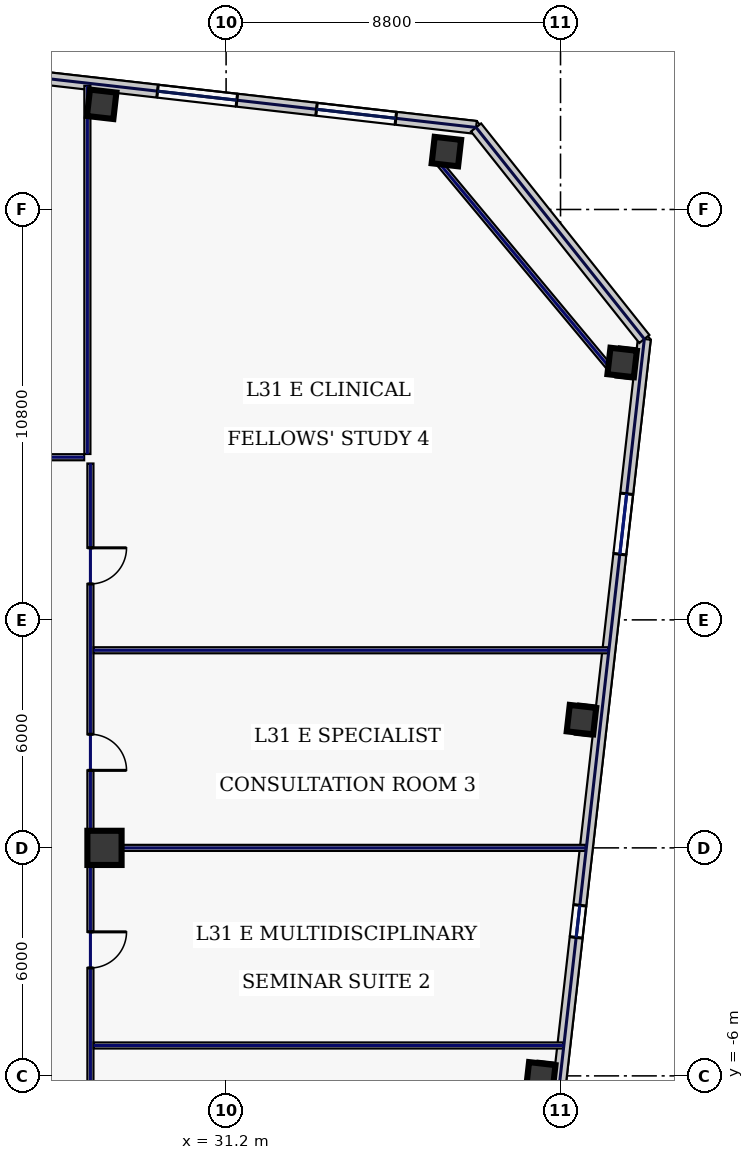
"""IFC4 building model, lengths in metres.
Left out: names, types, materials, properties, quantities, classifications, styles, units other than length and angle.
Written with IfcOpenShell. Run it as: python <this file> out.ifc"""

import sys

from ifc_helpers import new_model, si_unit, direction, frame, frame_2d, origin, origin_2d, place, context, subcontext, project, spatial, rectangle, hollow_rectangle, extrude, element, fill, save


model = new_model("IFC4")
c1 = context("Model", 3, precision=1e-05, world=origin(), true_north=direction((0.0, 1.0)))
c2 = subcontext(c1, "Body", "Model", "MODEL_VIEW")
j1 = project(units=[si_unit("LENGTHUNIT", "METRE"), si_unit("PLANEANGLEUNIT", "RADIAN")], contexts=[c1])
p1 = place(None, origin())
s1 = spatial("IfcSite", under=j1, at=p1, CompositionType="ELEMENT")
p2 = place(p1, origin())
s2 = spatial("IfcBuilding", under=s1, at=p2, CompositionType="ELEMENT")
p3 = place(p2, frame((0.0, 0.0, 137.4)))
s3 = spatial("IfcBuildingStorey", under=s2, at=p3, CompositionType="ELEMENT", Elevation=137.4)
p4 = place(p3, frame((28.0, 0.0, 0.0), z_axis=(0.0, 0.0, 1.0), x_axis=(1.0, 0.0, 0.0)))
e1 = element("IfcColumn", 1, at=p4, inside=s3, PredefinedType="COLUMN", context=c2, shape_type="SweptSolid", body=[
    extrude(hollow_rectangle(XDim=0.9, YDim=0.9, WallThickness=0.04, at=origin_2d()), origin(), (0.0, 0.0, 1.0), 3.74),
])
for number, where, z_axis, x_axis in (
    (2, (36.997, 18.323, 0.0), (0.0, 0.0, 1.0), (0.994, -0.113, 0.0)),
    (3, (27.926, 19.568, 0.0), (0.0, 0.0, 1.0), (0.994, -0.113, 0.0)),
    (4, (39.48, -6.025, 0.0), (0.0, 0.0, 1.0), (0.994, -0.113, 0.0)),
    (5, (40.551, 3.375, 0.0), (0.0, 0.0, 1.0), (0.994, -0.113, 0.0)),
    (6, (41.622, 12.774, 0.0), (0.0, 0.0, 1.0), (0.994, -0.113, 0.0)),
):
    element("IfcColumn", number, at=place(p3, frame(where, z_axis=z_axis, x_axis=x_axis)), inside=s3, PredefinedType="COLUMN", context=c2, shape_type="SweptSolid", body=[
        extrude(hollow_rectangle(XDim=0.7, YDim=0.7, WallThickness=0.032, at=origin_2d()), origin(), (0.0, 0.0, 1.0), 3.74),
    ])
p5 = place(p3, frame((37.777, 18.958, 0.0), z_axis=(0.0, 0.0, 1.0), x_axis=(-0.993571362037, 0.113207546299, 0.0)))
e7 = element("IfcWall", 7, at=p5, inside=s3, PredefinedType="STANDARD", context=c2, shape_type="SweptSolid", body=[
    extrude(rectangle(XDim=21.223, YDim=0.34, at=frame_2d((10.611, 0.0))), origin(), (0.0, 0.0, 1.0), 3.74),
])
p6 = place(p5, frame((16.756, 0.0, 0.67)))
e8 = element("IfcOpeningElement", 8, at=p6, cuts=e7, PredefinedType="OPENING", context=c2, shape_type="SweptSolid", body=[
    extrude(rectangle(XDim=0.85, YDim=1.85, at=frame_2d((0.425, 0.925))), frame((0.0, 0.18, 0.0), z_axis=(0.0, -1.0, 0.0), x_axis=(1.0, 0.0, 0.0)), (0.0, 0.0, 1.0), 0.36),
])
p7 = place(p5, frame((11.285, 0.0, 0.67)))
e9 = element("IfcOpeningElement", 9, at=p7, cuts=e7, PredefinedType="OPENING", context=c2, shape_type="SweptSolid", body=[
    extrude(rectangle(XDim=2.1, YDim=2.2, at=frame_2d((1.05, 1.1))), frame((0.0, 0.18, 0.0), z_axis=(0.0, -1.0, 0.0), x_axis=(1.0, 0.0, 0.0)), (0.0, 0.0, 1.0), 0.36),
])
p8 = place(p5, frame((6.336, 0.0, 0.67)))
e10 = element("IfcOpeningElement", 10, at=p8, cuts=e7, PredefinedType="OPENING", context=c2, shape_type="SweptSolid", body=[
    extrude(rectangle(XDim=2.1, YDim=2.2, at=frame_2d((1.05, 1.1))), frame((0.0, 0.18, 0.0), z_axis=(0.0, -1.0, 0.0), x_axis=(1.0, 0.0, 0.0)), (0.0, 0.0, 1.0), 0.36),
])
p9 = place(p5, frame((2.125, 0.0, 0.67)))
e11 = element("IfcOpeningElement", 11, at=p9, cuts=e7, PredefinedType="OPENING", context=c2, shape_type="SweptSolid", body=[
    extrude(rectangle(XDim=2.1, YDim=2.2, at=frame_2d((1.05, 1.1))), frame((0.0, 0.18, 0.0), z_axis=(0.0, -1.0, 0.0), x_axis=(1.0, 0.0, 0.0)), (0.0, 0.0, 1.0), 0.36),
])
p10 = place(p3, frame((37.768, -25.556, 0.0), z_axis=(0.0, 0.0, 1.0), x_axis=(0.113201605824, 0.993572038877, 0.0)))
e12 = element("IfcWall", 12, at=p10, inside=s3, PredefinedType="STANDARD", context=c2, shape_type="SweptSolid", body=[
    extrude(rectangle(XDim=39.2, YDim=0.34, at=frame_2d((19.6, 0.0))), origin(), (0.0, 0.0, 1.0), 3.74),
])
p11 = place(p10, frame((4.1, 0.0, 0.58)))
e13 = element("IfcOpeningElement", 13, at=p11, cuts=e12, PredefinedType="OPENING", context=c2, shape_type="SweptSolid", body=[
    extrude(rectangle(XDim=1.6, YDim=2.3, at=frame_2d((0.8, 1.15))), frame((0.0, 0.18, 0.0), z_axis=(0.0, -1.0, 0.0), x_axis=(1.0, 0.0, 0.0)), (0.0, 0.0, 1.0), 0.36),
])
p12 = place(p10, frame((13.9, 0.0, 0.58)))
e14 = element("IfcOpeningElement", 14, at=p12, cuts=e12, PredefinedType="OPENING", context=c2, shape_type="SweptSolid", body=[
    extrude(rectangle(XDim=1.6, YDim=2.3, at=frame_2d((0.8, 1.15))), frame((0.0, 0.18, 0.0), z_axis=(0.0, -1.0, 0.0), x_axis=(1.0, 0.0, 0.0)), (0.0, 0.0, 1.0), 0.36),
])
p13 = place(p10, frame((23.35, 0.0, 0.75)))
e15 = element("IfcOpeningElement", 15, at=p13, cuts=e12, PredefinedType="OPENING", context=c2, shape_type="SweptSolid", body=[
    extrude(rectangle(XDim=0.85, YDim=1.85, at=frame_2d((0.425, 0.925))), frame((0.0, 0.18, 0.0), z_axis=(0.0, -1.0, 0.0), x_axis=(1.0, 0.0, 0.0)), (0.0, 0.0, 1.0), 0.36),
])
p14 = place(p10, frame((33.5, 0.0, 0.58)))
e16 = element("IfcOpeningElement", 16, at=p14, cuts=e12, PredefinedType="OPENING", context=c2, shape_type="SweptSolid", body=[
    extrude(rectangle(XDim=1.6, YDim=2.3, at=frame_2d((0.8, 1.15))), frame((0.0, 0.18, 0.0), z_axis=(0.0, -1.0, 0.0), x_axis=(1.0, 0.0, 0.0)), (0.0, 0.0, 1.0), 0.36),
])
p15 = place(p3, frame((42.206, 13.392, 0.0), z_axis=(0.0, 0.0, 1.0), x_axis=(-0.622524521309, 0.782600294128, 0.0)))
e17 = element("IfcWall", 17, at=p15, inside=s3, PredefinedType="STANDARD", context=c2, shape_type="SweptSolid", body=[
    extrude(rectangle(XDim=7.113, YDim=0.34, at=frame_2d((3.557, 0.0))), origin(), (0.0, 0.0, 1.0), 3.74),
])
p16 = place(p3, frame((41.361, 12.556, 0.0), z_axis=(0.0, 0.0, 1.0), x_axis=(-0.640217638562, 0.768193579298, 0.0)))
e18 = element("IfcWall", 18, at=p16, inside=s3, PredefinedType="PARTITIONING", context=c2, shape_type="SweptSolid", body=[
    extrude(rectangle(XDim=7.224, YDim=0.16, at=frame_2d((3.612, 0.0))), origin(), (0.0, 0.0, 1.0), 3.74),
])
p17 = place(p3, frame((-27.465, 10.28, 0.0), z_axis=(0.0, 0.0, 1.0), x_axis=(1.0, 0.0, 0.0)))
e19 = element("IfcWall", 19, at=p17, inside=s3, PredefinedType="PARTITIONING", context=c2, shape_type="SweptSolid", body=[
    extrude(rectangle(XDim=54.93, YDim=0.16, at=frame_2d((27.465, 0.0))), origin(), (0.0, 0.0, 1.0), 3.74),
])
p18 = place(p17, frame((1.869, 0.0, 0.0)))
e20 = element("IfcOpeningElement", 20, at=p18, cuts=e19, PredefinedType="OPENING", context=c2, shape_type="SweptSolid", body=[
    extrude(rectangle(XDim=1.3, YDim=2.2, at=frame_2d((0.65, 1.1))), frame((0.0, 0.09, 0.0), z_axis=(0.0, -1.0, 0.0), x_axis=(1.0, 0.0, 0.0)), (0.0, 0.0, 1.0), 0.18),
])
p19 = place(p17, frame((7.1, 0.0, 0.0)))
e21 = element("IfcOpeningElement", 21, at=p19, cuts=e19, PredefinedType="OPENING", context=c2, shape_type="SweptSolid", body=[
    extrude(rectangle(XDim=0.95, YDim=2.2, at=frame_2d((0.475, 1.1))), frame((0.0, 0.09, 0.0), z_axis=(0.0, -1.0, 0.0), x_axis=(1.0, 0.0, 0.0)), (0.0, 0.0, 1.0), 0.18),
])
p20 = place(p17, frame((12.5, 0.0, 0.0)))
e22 = element("IfcOpeningElement", 22, at=p20, cuts=e19, PredefinedType="OPENING", context=c2, shape_type="SweptSolid", body=[
    extrude(rectangle(XDim=0.95, YDim=2.2, at=frame_2d((0.475, 1.1))), frame((0.0, 0.09, 0.0), z_axis=(0.0, -1.0, 0.0), x_axis=(1.0, 0.0, 0.0)), (0.0, 0.0, 1.0), 0.18),
])
p21 = place(p17, frame((18.325, 0.0, 0.0)))
e23 = element("IfcOpeningElement", 23, at=p21, cuts=e19, PredefinedType="OPENING", context=c2, shape_type="SweptSolid", body=[
    extrude(rectangle(XDim=0.95, YDim=2.2, at=frame_2d((0.475, 1.1))), frame((0.0, 0.09, 0.0), z_axis=(0.0, -1.0, 0.0), x_axis=(1.0, 0.0, 0.0)), (0.0, 0.0, 1.0), 0.18),
])
p22 = place(p17, frame((24.575, 0.0, 0.0)))
e24 = element("IfcOpeningElement", 24, at=p22, cuts=e19, PredefinedType="OPENING", context=c2, shape_type="SweptSolid", body=[
    extrude(rectangle(XDim=0.95, YDim=2.2, at=frame_2d((0.475, 1.1))), frame((0.0, 0.09, 0.0), z_axis=(0.0, -1.0, 0.0), x_axis=(1.0, 0.0, 0.0)), (0.0, 0.0, 1.0), 0.18),
])
p23 = place(p17, frame((30.69, 0.0, 0.0)))
e25 = element("IfcOpeningElement", 25, at=p23, cuts=e19, PredefinedType="OPENING", context=c2, shape_type="SweptSolid", body=[
    extrude(rectangle(XDim=1.3, YDim=2.2, at=frame_2d((0.65, 1.1))), frame((0.0, 0.09, 0.0), z_axis=(0.0, -1.0, 0.0), x_axis=(1.0, 0.0, 0.0)), (0.0, 0.0, 1.0), 0.18),
])
p24 = place(p17, frame((37.02, 0.0, 0.0)))
e26 = element("IfcOpeningElement", 26, at=p24, cuts=e19, PredefinedType="OPENING", context=c2, shape_type="SweptSolid", body=[
    extrude(rectangle(XDim=1.3, YDim=2.2, at=frame_2d((0.65, 1.1))), frame((0.0, 0.09, 0.0), z_axis=(0.0, -1.0, 0.0), x_axis=(1.0, 0.0, 0.0)), (0.0, 0.0, 1.0), 0.18),
])
p25 = place(p17, frame((44.73, 0.0, 0.0)))
e27 = element("IfcOpeningElement", 27, at=p25, cuts=e19, PredefinedType="OPENING", context=c2, shape_type="SweptSolid", body=[
    extrude(rectangle(XDim=1.3, YDim=2.2, at=frame_2d((0.65, 1.1))), frame((0.0, 0.09, 0.0), z_axis=(0.0, -1.0, 0.0), x_axis=(1.0, 0.0, 0.0)), (0.0, 0.0, 1.0), 0.18),
])
p26 = place(p17, frame((51.956, 0.0, 0.0)))
e28 = element("IfcOpeningElement", 28, at=p26, cuts=e19, PredefinedType="OPENING", context=c2, shape_type="SweptSolid", body=[
    extrude(rectangle(XDim=0.95, YDim=2.2, at=frame_2d((0.475, 1.1))), frame((0.0, 0.09, 0.0), z_axis=(0.0, -1.0, 0.0), x_axis=(1.0, 0.0, 0.0)), (0.0, 0.0, 1.0), 0.18),
])
p27 = place(p3, frame((27.63, 10.115, 0.0), z_axis=(0.0, 0.0, 1.0), x_axis=(0.0, -1.0, 0.0)))
e29 = element("IfcWall", 29, at=p27, inside=s3, PredefinedType="PARTITIONING", context=c2, shape_type="SweptSolid", body=[
    extrude(rectangle(XDim=20.13, YDim=0.16, at=frame_2d((10.065, 0.0))), origin(), (0.0, 0.0, 1.0), 3.74),
])
p28 = place(p27, frame((17.181, 0.0, 0.0)))
e30 = element("IfcOpeningElement", 30, at=p28, cuts=e29, PredefinedType="OPENING", context=c2, shape_type="SweptSolid", body=[
    extrude(rectangle(XDim=0.95, YDim=2.2, at=frame_2d((0.475, 1.1))), frame((0.0, 0.09, 0.0), z_axis=(0.0, -1.0, 0.0), x_axis=(1.0, 0.0, 0.0)), (0.0, 0.0, 1.0), 0.18),
])
p29 = place(p27, frame((12.325, 0.0, 0.0)))
e31 = element("IfcOpeningElement", 31, at=p29, cuts=e29, PredefinedType="OPENING", context=c2, shape_type="SweptSolid", body=[
    extrude(rectangle(XDim=0.95, YDim=2.2, at=frame_2d((0.475, 1.1))), frame((0.0, 0.09, 0.0), z_axis=(0.0, -1.0, 0.0), x_axis=(1.0, 0.0, 0.0)), (0.0, 0.0, 1.0), 0.18),
])
p30 = place(p27, frame((7.125, 0.0, 0.0)))
e32 = element("IfcOpeningElement", 32, at=p30, cuts=e29, PredefinedType="OPENING", context=c2, shape_type="SweptSolid", body=[
    extrude(rectangle(XDim=0.95, YDim=2.2, at=frame_2d((0.475, 1.1))), frame((0.0, 0.09, 0.0), z_axis=(0.0, -1.0, 0.0), x_axis=(1.0, 0.0, 0.0)), (0.0, 0.0, 1.0), 0.18),
])
p31 = place(p27, frame((2.219, 0.0, 0.0)))
e33 = element("IfcOpeningElement", 33, at=p31, cuts=e29, PredefinedType="OPENING", context=c2, shape_type="SweptSolid", body=[
    extrude(rectangle(XDim=0.95, YDim=2.2, at=frame_2d((0.475, 1.1))), frame((0.0, 0.09, 0.0), z_axis=(0.0, -1.0, 0.0), x_axis=(1.0, 0.0, 0.0)), (0.0, 0.0, 1.0), 0.18),
])
p32 = place(p3, frame((27.55, 10.365, 0.0), z_axis=(0.0, 0.0, 1.0), x_axis=(0.0, 1.0, 0.0)))
e34 = element("IfcWall", 34, at=p32, inside=s3, PredefinedType="PARTITIONING", context=c2, shape_type="SweptSolid", body=[
    extrude(rectangle(XDim=9.688, YDim=0.16, at=frame_2d((4.844, 0.0))), origin(), (0.0, 0.0, 1.0), 3.74),
])
p33 = place(p3, frame((27.715, -5.2, 0.0), z_axis=(0.0, 0.0, 1.0), x_axis=(1.0, 0.0, 0.0)))
e35 = element("IfcWall", 35, at=p33, inside=s3, PredefinedType="PARTITIONING", context=c2, shape_type="SweptSolid", body=[
    extrude(rectangle(XDim=12.352, YDim=0.16, at=frame_2d((6.176, 0.0))), origin(), (0.0, 0.0, 1.0), 3.74),
])
p34 = place(p3, frame((27.715, 0.0, 0.0), z_axis=(0.0, 0.0, 1.0), x_axis=(1.0, 0.0, 0.0)))
e36 = element("IfcWall", 36, at=p34, inside=s3, PredefinedType="PARTITIONING", context=c2, shape_type="SweptSolid", body=[
    extrude(rectangle(XDim=12.945, YDim=0.16, at=frame_2d((6.472, 0.0))), origin(), (0.0, 0.0, 1.0), 3.235),
])
p35 = place(p3, frame((27.715, 5.2, 0.0), z_axis=(0.0, 0.0, 1.0), x_axis=(1.0, 0.0, 0.0)))
e37 = element("IfcWall", 37, at=p35, inside=s3, PredefinedType="PARTITIONING", context=c2, shape_type="SweptSolid", body=[
    extrude(rectangle(XDim=13.537, YDim=0.16, at=frame_2d((6.769, 0.0))), origin(), (0.0, 0.0, 1.0), 3.74),
])
p36 = place(p8, origin())
e38 = element("IfcWindow", 38, at=p36, inside=s3, PartitioningType="SINGLE_PANEL", PredefinedType="WINDOW", context=c2, shape_type="SweptSolid", body=[
    extrude(rectangle(XDim=2.1, YDim=2.2, at=frame_2d((1.05, 1.1))), frame((0.0, 0.03, 0.0), z_axis=(0.0, -1.0, 0.0), x_axis=(1.0, 0.0, 0.0)), (0.0, 0.0, 1.0), 0.06),
])
fill(e10, e38)
p37 = place(p9, origin())
e39 = element("IfcWindow", 39, at=p37, inside=s3, PartitioningType="SINGLE_PANEL", PredefinedType="WINDOW", context=c2, shape_type="SweptSolid", body=[
    extrude(rectangle(XDim=2.1, YDim=2.2, at=frame_2d((1.05, 1.1))), frame((0.0, 0.03, 0.0), z_axis=(0.0, -1.0, 0.0), x_axis=(1.0, 0.0, 0.0)), (0.0, 0.0, 1.0), 0.06),
])
fill(e11, e39)
p38 = place(p13, origin())
e40 = element("IfcWindow", 40, at=p38, inside=s3, PartitioningType="SINGLE_PANEL", PredefinedType="WINDOW", context=c2, shape_type="SweptSolid", body=[
    extrude(rectangle(XDim=0.85, YDim=1.85, at=frame_2d((0.425, 0.925))), frame((0.0, 0.03, 0.0), z_axis=(0.0, -1.0, 0.0), x_axis=(1.0, 0.0, 0.0)), (0.0, 0.0, 1.0), 0.06),
])
fill(e15, e40)
p39 = place(p14, origin())
e41 = element("IfcWindow", 41, at=p39, inside=s3, PartitioningType="SINGLE_PANEL", PredefinedType="WINDOW", context=c2, shape_type="SweptSolid", body=[
    extrude(rectangle(XDim=1.6, YDim=2.3, at=frame_2d((0.8, 1.15))), frame((0.0, 0.03, 0.0), z_axis=(0.0, -1.0, 0.0), x_axis=(1.0, 0.0, 0.0)), (0.0, 0.0, 1.0), 0.06),
])
fill(e16, e41)
p40 = place(p29, origin())
e42 = element("IfcDoor", 42, at=p40, inside=s3, OperationType="SINGLE_SWING_LEFT", PredefinedType="DOOR", context=c2, shape_type="SweptSolid", body=[
    extrude(rectangle(XDim=0.95, YDim=2.2, at=frame_2d((0.475, 1.1))), frame((0.0, 0.025, 0.0), z_axis=(0.0, -1.0, 0.0), x_axis=(1.0, 0.0, 0.0)), (0.0, 0.0, 1.0), 0.05),
])
fill(e31, e42)
p41 = place(p30, origin())
e43 = element("IfcDoor", 43, at=p41, inside=s3, OperationType="SINGLE_SWING_RIGHT", PredefinedType="DOOR", context=c2, shape_type="SweptSolid", body=[
    extrude(rectangle(XDim=0.95, YDim=2.2, at=frame_2d((0.475, 1.1))), frame((0.0, 0.025, 0.0), z_axis=(0.0, -1.0, 0.0), x_axis=(1.0, 0.0, 0.0)), (0.0, 0.0, 1.0), 0.05),
])
fill(e32, e43)
p42 = place(p31, origin())
e44 = element("IfcDoor", 44, at=p42, inside=s3, OperationType="SINGLE_SWING_LEFT", PredefinedType="DOOR", context=c2, shape_type="SweptSolid", body=[
    extrude(rectangle(XDim=0.95, YDim=2.2, at=frame_2d((0.475, 1.1))), frame((0.0, 0.025, 0.0), z_axis=(0.0, -1.0, 0.0), x_axis=(1.0, 0.0, 0.0)), (0.0, 0.0, 1.0), 0.05),
])
fill(e33, e44)
save(model, sys.argv[1])
